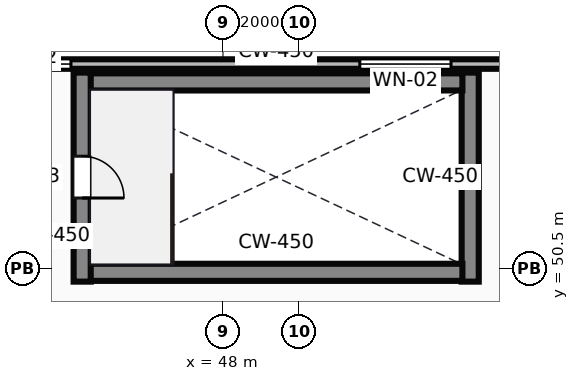
"""IFC4 building model, lengths in metres.
Left out: names, types, materials, properties, quantities, classifications, styles, units other than length and angle.
Written with IfcOpenShell. Run it as: python <this file> out.ifc"""

import sys

from ifc_helpers import new_model, si_unit, direction, frame, frame_2d, origin, place, context, subcontext, project, spatial, rectangle, extrude, source, transform, mapped, element, fill, save


model = new_model("IFC4")
c1 = context("Model", 3, precision=1e-05, world=origin(), true_north=direction((0.0, 1.0)))
c2 = subcontext(c1, "Body", "Model", "MODEL_VIEW")
j1 = project(units=[si_unit("LENGTHUNIT", "METRE"), si_unit("PLANEANGLEUNIT", "RADIAN")], contexts=[c1])
p1 = place(None, origin())
s1 = spatial("IfcSite", under=j1, at=p1, CompositionType="ELEMENT")
p2 = place(p1, origin())
s2 = spatial("IfcBuilding", under=s1, at=p2, CompositionType="ELEMENT")
p3 = place(p2, frame((0.0, 0.0, 21.0)))
s3 = spatial("IfcBuildingStorey", under=s2, at=p3, CompositionType="ELEMENT", Elevation=21.0)
m1 = source(origin(), c2, "Body", "SweptSolid", [
    extrude(rectangle(XDim=82.0, YDim=0.25, at=frame_2d((41.0, 0.0))), origin(), (0.0, 0.0, 1.0), 4.7),
])
p4 = place(p3, frame((82.0, 55.875, 0.0), z_axis=(0.0, 0.0, 1.0), x_axis=(-1.0, 0.0, 0.0)))
e1 = element("IfcWall", 1, at=p4, inside=s3, PredefinedType="STANDARD", context=c2, shape_type="MappedRepresentation", body=[
    mapped(m1, transform((0.0, 0.0, 0.0))),
])
p5 = place(p4, frame((8.0, 0.0, 0.9)))
e2 = element("IfcOpeningElement", 2, at=p5, cuts=e1, PredefinedType="OPENING", context=c2, shape_type="SweptSolid", body=[
    extrude(rectangle(XDim=2.4, YDim=2.2, at=frame_2d((1.2, 1.1))), frame((0.0, 0.135, 0.0), z_axis=(0.0, -1.0, 0.0), x_axis=(1.0, 0.0, 0.0)), (0.0, 0.0, 1.0), 0.27),
])
p6 = place(p4, frame((18.0, 0.0, 0.9)))
e3 = element("IfcOpeningElement", 3, at=p6, cuts=e1, PredefinedType="OPENING", context=c2, shape_type="SweptSolid", body=[
    extrude(rectangle(XDim=2.4, YDim=2.2, at=frame_2d((1.2, 1.1))), frame((0.0, 0.135, 0.0), z_axis=(0.0, -1.0, 0.0), x_axis=(1.0, 0.0, 0.0)), (0.0, 0.0, 1.0), 0.27),
])
p7 = place(p4, frame((28.0, 0.0, 0.9)))
e4 = element("IfcOpeningElement", 4, at=p7, cuts=e1, PredefinedType="OPENING", context=c2, shape_type="SweptSolid", body=[
    extrude(rectangle(XDim=2.4, YDim=2.2, at=frame_2d((1.2, 1.1))), frame((0.0, 0.135, 0.0), z_axis=(0.0, -1.0, 0.0), x_axis=(1.0, 0.0, 0.0)), (0.0, 0.0, 1.0), 0.27),
])
p8 = place(p4, frame((38.0, 0.0, 0.9)))
e5 = element("IfcOpeningElement", 5, at=p8, cuts=e1, PredefinedType="OPENING", context=c2, shape_type="SweptSolid", body=[
    extrude(rectangle(XDim=2.4, YDim=2.2, at=frame_2d((1.2, 1.1))), frame((0.0, 0.135, 0.0), z_axis=(0.0, -1.0, 0.0), x_axis=(1.0, 0.0, 0.0)), (0.0, 0.0, 1.0), 0.27),
])
p9 = place(p4, frame((46.5, 0.0, 0.9)))
e6 = element("IfcOpeningElement", 6, at=p9, cuts=e1, PredefinedType="OPENING", context=c2, shape_type="SweptSolid", body=[
    extrude(rectangle(XDim=2.4, YDim=2.2, at=frame_2d((1.2, 1.1))), frame((0.0, 0.135, 0.0), z_axis=(0.0, -1.0, 0.0), x_axis=(1.0, 0.0, 0.0)), (0.0, 0.0, 1.0), 0.27),
])
p10 = place(p4, frame((58.0, 0.0, 0.9)))
e7 = element("IfcOpeningElement", 7, at=p10, cuts=e1, PredefinedType="OPENING", context=c2, shape_type="SweptSolid", body=[
    extrude(rectangle(XDim=2.4, YDim=2.2, at=frame_2d((1.2, 1.1))), frame((0.0, 0.135, 0.0), z_axis=(0.0, -1.0, 0.0), x_axis=(1.0, 0.0, 0.0)), (0.0, 0.0, 1.0), 0.27),
])
p11 = place(p4, frame((66.0, 0.0, 0.9)))
e8 = element("IfcOpeningElement", 8, at=p11, cuts=e1, PredefinedType="OPENING", context=c2, shape_type="SweptSolid", body=[
    extrude(rectangle(XDim=2.4, YDim=2.2, at=frame_2d((1.2, 1.1))), frame((0.0, 0.135, 0.0), z_axis=(0.0, -1.0, 0.0), x_axis=(1.0, 0.0, 0.0)), (0.0, 0.0, 1.0), 0.27),
])
m2 = source(origin(), c2, "Body", "SweptSolid", [
    extrude(rectangle(XDim=5.5, YDim=0.45, at=frame_2d((2.75, 0.0))), origin(), (0.0, 0.0, 1.0), 4.7),
])
p12 = place(p3, frame((44.295, 50.15, 0.0), z_axis=(0.0, 0.0, 1.0), x_axis=(0.0, 1.0, 0.0)))
e9 = element("IfcWall", 9, at=p12, inside=s3, PredefinedType="SHEAR", context=c2, shape_type="MappedRepresentation", body=[
    mapped(m2, transform((0.0, 0.0, 0.0))),
])
p13 = place(p12, frame((2.2, 0.0, 0.0)))
e10 = element("IfcOpeningElement", 10, at=p13, cuts=e9, PredefinedType="OPENING", context=c2, shape_type="SweptSolid", body=[
    extrude(rectangle(XDim=1.1, YDim=2.15, at=frame_2d((0.55, 1.075))), frame((0.0, 0.235, 0.0), z_axis=(0.0, -1.0, 0.0), x_axis=(1.0, 0.0, 0.0)), (0.0, 0.0, 1.0), 0.47),
])
m3 = source(origin(), c2, "Body", "SweptSolid", [
    extrude(rectangle(XDim=9.8, YDim=0.45, at=frame_2d((4.9, 0.0))), origin(), (0.0, 0.0, 1.0), 4.7),
])
for number, where, z_axis, x_axis in (
    (11, (44.5, 50.395, 0.0), (0.0, 0.0, 1.0), (1.0, 0.0, 0.0)),
    (12, (44.5, 55.405, 0.0), (0.0, 0.0, 1.0), (1.0, 0.0, 0.0)),
):
    element("IfcWall", number, at=place(p3, frame(where, z_axis=z_axis, x_axis=x_axis)), inside=s3, PredefinedType="SHEAR", context=c2, shape_type="MappedRepresentation", body=[
        mapped(m3, transform((0.0, 0.0, 0.0))),
    ])
p14 = place(p3, frame((54.505, 50.15, 0.0), z_axis=(0.0, 0.0, 1.0), x_axis=(0.0, 1.0, 0.0)))
e13 = element("IfcWall", 13, at=p14, inside=s3, PredefinedType="SHEAR", context=c2, shape_type="MappedRepresentation", body=[
    mapped(m2, transform((0.0, 0.0, 0.0))),
])
m4 = source(origin(), c2, "Body", "SweptSolid", [
    extrude(rectangle(XDim=2.4, YDim=2.2, at=frame_2d((1.2, 1.1))), frame((0.0, 0.03, 0.0), z_axis=(0.0, -1.0, 0.0), x_axis=(1.0, 0.0, 0.0)), (0.0, 0.0, 1.0), 0.06),
])
p15 = place(p7, origin())
e14 = element("IfcWindow", 14, at=p15, inside=s3, PartitioningType="SINGLE_PANEL", PredefinedType="WINDOW", context=c2, shape_type="MappedRepresentation", body=[
    mapped(m4, transform((0.0, 0.0, 0.0))),
])
fill(e4, e14)
p16 = place(p8, origin())
e15 = element("IfcWindow", 15, at=p16, inside=s3, PartitioningType="SINGLE_PANEL", PredefinedType="WINDOW", context=c2, shape_type="MappedRepresentation", body=[
    mapped(m4, transform((0.0, 0.0, 0.0))),
])
fill(e5, e15)
m5 = source(origin(), c2, "Body", "SweptSolid", [
    extrude(rectangle(XDim=1.1, YDim=2.15, at=frame_2d((0.55, 1.075))), frame((0.0, 0.025, 0.0), z_axis=(0.0, -1.0, 0.0), x_axis=(1.0, 0.0, 0.0)), (0.0, 0.0, 1.0), 0.05),
])
p17 = place(p13, frame((1.1, 0.0, 0.0), z_axis=(0.0, 0.0, 1.0), x_axis=(-1.0, 0.0, 0.0)))
e16 = element("IfcDoor", 16, at=p17, inside=s3, OperationType="SINGLE_SWING_LEFT", PredefinedType="DOOR", context=c2, shape_type="MappedRepresentation", body=[
    mapped(m5, transform((0.0, 0.0, 0.0))),
])
fill(e10, e16)
save(model, sys.argv[1])
